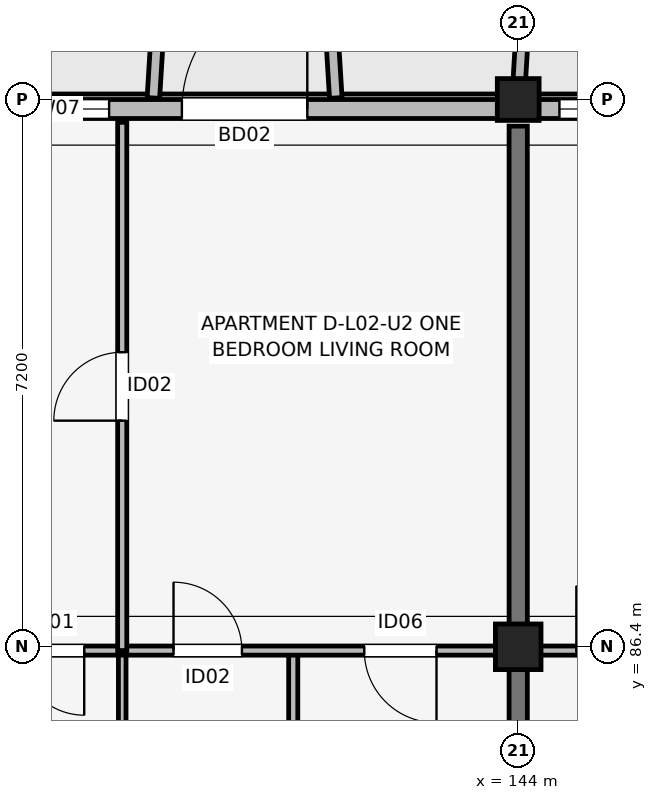
"""IFC4 building model, lengths in metres.
Left out: names, types, materials, properties, quantities, classifications, styles, units other than length and angle.
Written with IfcOpenShell. Run it as: python <this file> out.ifc"""

import sys

from ifc_helpers import new_model, si_unit, direction, frame, frame_2d, origin, origin_2d, place, context, subcontext, project, spatial, rectangle, extrude, element, fill, save


model = new_model("IFC4")
c1 = context("Model", 3, precision=1e-05, world=origin(), true_north=direction((0.0, 1.0)))
c2 = subcontext(c1, "Body", "Model", "MODEL_VIEW")
j1 = project(units=[si_unit("LENGTHUNIT", "METRE"), si_unit("PLANEANGLEUNIT", "RADIAN")], contexts=[c1])
p1 = place(None, origin())
s1 = spatial("IfcSite", under=j1, at=p1, CompositionType="ELEMENT")
p2 = place(p1, origin())
s2 = spatial("IfcBuilding", under=s1, at=p2, CompositionType="ELEMENT")
p3 = place(p2, frame((0.0, 0.0, 8.7)))
s3 = spatial("IfcBuildingStorey", under=s2, at=p3, CompositionType="ELEMENT", Elevation=8.7)
p4 = place(p3, frame((144.0, 86.4, 0.0), z_axis=(0.0, 0.0, 1.0), x_axis=(1.0, 0.0, 0.0)))
e1 = element("IfcColumn", 1, at=p4, inside=s3, PredefinedType="COLUMN", context=c2, shape_type="SweptSolid", body=[
    extrude(rectangle(XDim=0.6, YDim=0.6, at=origin_2d()), origin(), (0.0, 0.0, 1.0), 3.15),
])
p5 = place(p3, frame((144.0, 93.6, 0.0), z_axis=(0.0, 0.0, 1.0), x_axis=(1.0, 0.0, 0.0)))
e2 = element("IfcColumn", 2, at=p5, inside=s3, PredefinedType="COLUMN", context=c2, shape_type="SweptSolid", body=[
    extrude(rectangle(XDim=0.55, YDim=0.55, at=origin_2d()), origin(), (0.0, 0.0, 1.0), 3.15),
])
p6 = place(p3, frame((144.0, 83.85, 0.0), z_axis=(0.0, 0.0, 1.0), x_axis=(0.0, 1.0, 0.0)))
e3 = element("IfcWall", 3, at=p6, inside=s3, PredefinedType="SHEAR", context=c2, shape_type="SweptSolid", body=[
    extrude(rectangle(XDim=9.4, YDim=0.24, at=frame_2d((4.7, 0.0))), origin(), (0.0, 0.0, 1.0), 3.15),
])
p7 = place(p3, frame((162.8, 93.475, 0.0), z_axis=(0.0, 0.0, 1.0), x_axis=(-1.0, 0.0, 0.0)))
e4 = element("IfcWall", 4, at=p7, inside=s3, PredefinedType="SOLIDWALL", context=c2, shape_type="SweptSolid", body=[
    extrude(rectangle(XDim=30.4, YDim=0.25, at=frame_2d((15.2, 0.0))), origin(), (0.0, 0.0, 1.0), 2.43),
])
p8 = place(p7, frame((23.225, 0.0, 0.0), z_axis=(0.0, 0.0, 1.0), x_axis=(-1.0, 0.0, 0.0)))
e5 = element("IfcOpeningElement", 5, at=p8, cuts=e4, PredefinedType="OPENING", context=c2, shape_type="SweptSolid", body=[
    extrude(rectangle(XDim=1.65, YDim=2.15, at=frame_2d((0.825, 1.075))), frame((0.0, 0.135, 0.0), z_axis=(0.0, -1.0, 0.0), x_axis=(1.0, 0.0, 0.0)), (0.0, 0.0, 1.0), 0.27),
])
p9 = place(p7, frame((8.75, 0.0, 0.0), z_axis=(0.0, 0.0, 1.0), x_axis=(-1.0, 0.0, 0.0)))
e6 = element("IfcOpeningElement", 6, at=p9, cuts=e4, PredefinedType="OPENING", context=c2, shape_type="SweptSolid", body=[
    extrude(rectangle(XDim=1.5, YDim=2.15, at=frame_2d((0.75, 1.075))), frame((0.0, 0.135, 0.0), z_axis=(0.0, -1.0, 0.0), x_axis=(1.0, 0.0, 0.0)), (0.0, 0.0, 1.0), 0.27),
])
p10 = place(p7, frame((26.438, 0.0, 0.75)))
e7 = element("IfcOpeningElement", 7, at=p10, cuts=e4, PredefinedType="OPENING", context=c2, shape_type="SweptSolid", body=[
    extrude(rectangle(XDim=1.22, YDim=1.5, at=frame_2d((0.61, 0.75))), frame((0.0, 0.135, 0.0), z_axis=(0.0, -1.0, 0.0), x_axis=(1.0, 0.0, 0.0)), (0.0, 0.0, 1.0), 0.27),
])
p11 = place(p7, frame((24.183, 0.0, 0.75)))
e8 = element("IfcOpeningElement", 8, at=p11, cuts=e4, PredefinedType="OPENING", context=c2, shape_type="SweptSolid", body=[
    extrude(rectangle(XDim=1.34, YDim=1.55, at=frame_2d((0.67, 0.775))), frame((0.0, 0.135, 0.0), z_axis=(0.0, -1.0, 0.0), x_axis=(1.0, 0.0, 0.0)), (0.0, 0.0, 1.0), 0.27),
])
p12 = place(p7, frame((16.798, 0.0, 0.75)))
e9 = element("IfcOpeningElement", 9, at=p12, cuts=e4, PredefinedType="OPENING", context=c2, shape_type="SweptSolid", body=[
    extrude(rectangle(XDim=1.46, YDim=1.55, at=frame_2d((0.73, 0.775))), frame((0.0, 0.135, 0.0), z_axis=(0.0, -1.0, 0.0), x_axis=(1.0, 0.0, 0.0)), (0.0, 0.0, 1.0), 0.27),
])
p13 = place(p7, frame((14.34, 0.0, 0.7)))
e10 = element("IfcOpeningElement", 10, at=p13, cuts=e4, PredefinedType="OPENING", context=c2, shape_type="SweptSolid", body=[
    extrude(rectangle(XDim=1.72, YDim=1.6, at=frame_2d((0.86, 0.8))), frame((0.0, 0.135, 0.0), z_axis=(0.0, -1.0, 0.0), x_axis=(1.0, 0.0, 0.0)), (0.0, 0.0, 1.0), 0.27),
])
p14 = place(p7, frame((9.968, 0.0, 0.75)))
e11 = element("IfcOpeningElement", 11, at=p14, cuts=e4, PredefinedType="OPENING", context=c2, shape_type="SweptSolid", body=[
    extrude(rectangle(XDim=0.72, YDim=1.35, at=frame_2d((0.36, 0.675))), frame((0.0, 0.135, 0.0), z_axis=(0.0, -1.0, 0.0), x_axis=(1.0, 0.0, 0.0)), (0.0, 0.0, 1.0), 0.27),
])
p15 = place(p7, frame((2.183, 0.0, 0.7)))
e12 = element("IfcOpeningElement", 12, at=p15, cuts=e4, PredefinedType="OPENING", context=c2, shape_type="SweptSolid", body=[
    extrude(rectangle(XDim=1.72, YDim=1.6, at=frame_2d((0.86, 0.8))), frame((0.0, 0.135, 0.0), z_axis=(0.0, -1.0, 0.0), x_axis=(1.0, 0.0, 0.0)), (0.0, 0.0, 1.0), 0.27),
])
for number, where, z_axis, x_axis in (
    (13, (139.2, 93.62, 0.0), (0.0, 0.0, 1.0), (0.061, 0.998, 0.0)),
    (14, (141.6, 93.62, 0.0), (0.0, 0.0, 1.0), (-0.061, 0.998, 0.0)),
):
    element("IfcWall", number, at=place(p3, frame(where, z_axis=z_axis, x_axis=x_axis)), inside=s3, PredefinedType="ELEMENTEDWALL", context=c2, shape_type="SweptSolid", body=[
        extrude(rectangle(XDim=1.964, YDim=0.165, at=frame_2d((0.982, 0.0))), origin(), (0.0, 0.0, 1.0), 2.53),
    ])
p16 = place(p3, frame((144.0, 93.62, 0.0), z_axis=(0.0, 0.0, 1.0), x_axis=(0.061170732449, 0.998127317276, 0.0)))
e15 = element("IfcWall", 15, at=p16, inside=s3, PredefinedType="ELEMENTEDWALL", context=c2, shape_type="SweptSolid", body=[
    extrude(rectangle(XDim=1.964, YDim=0.165, at=frame_2d((0.982, 0.0))), origin(), (0.0, 0.0, 1.0), 2.95),
])
p17 = place(p3, frame((138.79, 83.7, 0.0), z_axis=(0.0, 0.0, 1.0), x_axis=(0.0, 1.0, 0.0)))
e16 = element("IfcWall", 16, at=p17, inside=s3, PredefinedType="PARTITIONING", context=c2, shape_type="SweptSolid", body=[
    extrude(rectangle(XDim=2.65, YDim=0.1, at=frame_2d((1.325, 0.0))), origin(), (0.0, 0.0, 1.0), 2.375),
])
p18 = place(p3, frame((141.04, 83.7, 0.0), z_axis=(0.0, 0.0, 1.0), x_axis=(0.0, 1.0, 0.0)))
e17 = element("IfcWall", 17, at=p18, inside=s3, PredefinedType="PARTITIONING", context=c2, shape_type="SweptSolid", body=[
    extrude(rectangle(XDim=2.65, YDim=0.12, at=frame_2d((1.325, 0.0))), origin(), (0.0, 0.0, 1.0), 2.375),
])
p19 = place(p3, frame((136.94, 86.35, 0.0), z_axis=(0.0, 0.0, 1.0), x_axis=(1.0, 0.0, 0.0)))
e18 = element("IfcWall", 18, at=p19, inside=s3, PredefinedType="PARTITIONING", context=c2, shape_type="SweptSolid", body=[
    extrude(rectangle(XDim=6.92, YDim=0.12, at=frame_2d((3.46, 0.0))), origin(), (0.0, 0.0, 1.0), 2.375),
])
p20 = place(p19, frame((1.35, 0.0, 0.0), z_axis=(0.0, 0.0, 1.0), x_axis=(-1.0, 0.0, 0.0)))
e19 = element("IfcOpeningElement", 19, at=p20, cuts=e18, PredefinedType="OPENING", context=c2, shape_type="SweptSolid", body=[
    extrude(rectangle(XDim=0.85, YDim=2.08, at=frame_2d((0.425, 1.04))), frame((0.0, 0.07, 0.0), z_axis=(0.0, -1.0, 0.0), x_axis=(1.0, 0.0, 0.0)), (0.0, 0.0, 1.0), 0.14),
])
p21 = place(p19, frame((2.525, 0.0, 0.0)))
e20 = element("IfcOpeningElement", 20, at=p21, cuts=e18, PredefinedType="OPENING", context=c2, shape_type="SweptSolid", body=[
    extrude(rectangle(XDim=0.9, YDim=2.08, at=frame_2d((0.45, 1.04))), frame((0.0, 0.07, 0.0), z_axis=(0.0, -1.0, 0.0), x_axis=(1.0, 0.0, 0.0)), (0.0, 0.0, 1.0), 0.14),
])
p22 = place(p19, frame((5.985, 0.0, 0.0), z_axis=(0.0, 0.0, 1.0), x_axis=(-1.0, 0.0, 0.0)))
e21 = element("IfcOpeningElement", 21, at=p22, cuts=e18, PredefinedType="OPENING", context=c2, shape_type="SweptSolid", body=[
    extrude(rectangle(XDim=0.95, YDim=2.08, at=frame_2d((0.475, 1.04))), frame((0.0, 0.07, 0.0), z_axis=(0.0, -1.0, 0.0), x_axis=(1.0, 0.0, 0.0)), (0.0, 0.0, 1.0), 0.14),
])
p23 = place(p3, frame((138.79, 86.35, 0.0), z_axis=(0.0, 0.0, 1.0), x_axis=(0.0, 1.0, 0.0)))
e22 = element("IfcWall", 22, at=p23, inside=s3, PredefinedType="PARTITIONING", context=c2, shape_type="SweptSolid", body=[
    extrude(rectangle(XDim=6.95, YDim=0.12, at=frame_2d((3.475, 0.0))), origin(), (0.0, 0.0, 1.0), 2.375),
])
p24 = place(p23, frame((3.025, 0.0, 0.0)))
e23 = element("IfcOpeningElement", 23, at=p24, cuts=e22, PredefinedType="OPENING", context=c2, shape_type="SweptSolid", body=[
    extrude(rectangle(XDim=0.9, YDim=2.08, at=frame_2d((0.45, 1.04))), frame((0.0, 0.07, 0.0), z_axis=(0.0, -1.0, 0.0), x_axis=(1.0, 0.0, 0.0)), (0.0, 0.0, 1.0), 0.14),
])
p25 = place(p3, frame((144.14, 86.35, 0.0), z_axis=(0.0, 0.0, 1.0), x_axis=(1.0, 0.0, 0.0)))
e24 = element("IfcWall", 24, at=p25, inside=s3, PredefinedType="PARTITIONING", context=c2, shape_type="SweptSolid", body=[
    extrude(rectangle(XDim=6.92, YDim=0.12, at=frame_2d((3.46, 0.0))), origin(), (0.0, 0.0, 1.0), 2.375),
])
p26 = place(p25, frame((0.625, 0.0, 0.0)))
e25 = element("IfcOpeningElement", 25, at=p26, cuts=e24, PredefinedType="OPENING", context=c2, shape_type="SweptSolid", body=[
    extrude(rectangle(XDim=0.85, YDim=2.08, at=frame_2d((0.425, 1.04))), frame((0.0, 0.07, 0.0), z_axis=(0.0, -1.0, 0.0), x_axis=(1.0, 0.0, 0.0)), (0.0, 0.0, 1.0), 0.14),
])
p27 = place(p25, frame((3.525, 0.0, 0.0), z_axis=(0.0, 0.0, 1.0), x_axis=(-1.0, 0.0, 0.0)))
e26 = element("IfcOpeningElement", 26, at=p27, cuts=e24, PredefinedType="OPENING", context=c2, shape_type="SweptSolid", body=[
    extrude(rectangle(XDim=0.9, YDim=2.08, at=frame_2d((0.45, 1.04))), frame((0.0, 0.07, 0.0), z_axis=(0.0, -1.0, 0.0), x_axis=(1.0, 0.0, 0.0)), (0.0, 0.0, 1.0), 0.14),
])
p28 = place(p25, frame((5.01, 0.0, 0.0)))
e27 = element("IfcOpeningElement", 27, at=p28, cuts=e24, PredefinedType="OPENING", context=c2, shape_type="SweptSolid", body=[
    extrude(rectangle(XDim=0.95, YDim=2.08, at=frame_2d((0.475, 1.04))), frame((0.0, 0.07, 0.0), z_axis=(0.0, -1.0, 0.0), x_axis=(1.0, 0.0, 0.0)), (0.0, 0.0, 1.0), 0.14),
])
p29 = place(p8, origin())
e28 = element("IfcDoor", 28, at=p29, inside=s3, OperationType="SINGLE_SWING_LEFT", PredefinedType="DOOR", context=c2, shape_type="SweptSolid", body=[
    extrude(rectangle(XDim=1.65, YDim=2.15, at=frame_2d((0.825, 1.075))), frame((0.0, 0.025, 0.0), z_axis=(0.0, -1.0, 0.0), x_axis=(1.0, 0.0, 0.0)), (0.0, 0.0, 1.0), 0.05),
])
fill(e5, e28)
p30 = place(p11, origin())
e29 = element("IfcWindow", 29, at=p30, inside=s3, PartitioningType="SINGLE_PANEL", PredefinedType="WINDOW", context=c2, shape_type="SweptSolid", body=[
    extrude(rectangle(XDim=1.34, YDim=1.55, at=frame_2d((0.67, 0.775))), frame((0.0, 0.03, 0.0), z_axis=(0.0, -1.0, 0.0), x_axis=(1.0, 0.0, 0.0)), (0.0, 0.0, 1.0), 0.06),
])
fill(e8, e29)
p31 = place(p12, origin())
e30 = element("IfcWindow", 30, at=p31, inside=s3, PartitioningType="SINGLE_PANEL", PredefinedType="WINDOW", context=c2, shape_type="SweptSolid", body=[
    extrude(rectangle(XDim=1.46, YDim=1.55, at=frame_2d((0.73, 0.775))), frame((0.0, 0.03, 0.0), z_axis=(0.0, -1.0, 0.0), x_axis=(1.0, 0.0, 0.0)), (0.0, 0.0, 1.0), 0.06),
])
fill(e9, e30)
p32 = place(p20, origin())
e31 = element("IfcDoor", 31, at=p32, inside=s3, OperationType="SINGLE_SWING_RIGHT", PredefinedType="DOOR", context=c2, shape_type="SweptSolid", body=[
    extrude(rectangle(XDim=0.85, YDim=2.08, at=frame_2d((0.425, 1.04))), frame((0.0, 0.025, 0.0), z_axis=(0.0, -1.0, 0.0), x_axis=(1.0, 0.0, 0.0)), (0.0, 0.0, 1.0), 0.05),
])
fill(e19, e31)
p33 = place(p21, origin())
e32 = element("IfcDoor", 32, at=p33, inside=s3, OperationType="SINGLE_SWING_LEFT", PredefinedType="DOOR", context=c2, shape_type="SweptSolid", body=[
    extrude(rectangle(XDim=0.9, YDim=2.08, at=frame_2d((0.45, 1.04))), frame((0.0, 0.025, 0.0), z_axis=(0.0, -1.0, 0.0), x_axis=(1.0, 0.0, 0.0)), (0.0, 0.0, 1.0), 0.05),
])
fill(e20, e32)
p34 = place(p22, origin())
e33 = element("IfcDoor", 33, at=p34, inside=s3, OperationType="SINGLE_SWING_RIGHT", PredefinedType="DOOR", context=c2, shape_type="SweptSolid", body=[
    extrude(rectangle(XDim=0.95, YDim=2.08, at=frame_2d((0.475, 1.04))), frame((0.0, 0.025, 0.0), z_axis=(0.0, -1.0, 0.0), x_axis=(1.0, 0.0, 0.0)), (0.0, 0.0, 1.0), 0.05),
])
fill(e21, e33)
p35 = place(p24, origin())
e34 = element("IfcDoor", 34, at=p35, inside=s3, OperationType="SINGLE_SWING_LEFT", PredefinedType="DOOR", context=c2, shape_type="SweptSolid", body=[
    extrude(rectangle(XDim=0.9, YDim=2.08, at=frame_2d((0.45, 1.04))), frame((0.0, 0.025, 0.0), z_axis=(0.0, -1.0, 0.0), x_axis=(1.0, 0.0, 0.0)), (0.0, 0.0, 1.0), 0.05),
])
fill(e23, e34)
p36 = place(p26, origin())
e35 = element("IfcDoor", 35, at=p36, inside=s3, OperationType="SINGLE_SWING_LEFT", PredefinedType="DOOR", context=c2, shape_type="SweptSolid", body=[
    extrude(rectangle(XDim=0.85, YDim=2.08, at=frame_2d((0.425, 1.04))), frame((0.0, 0.025, 0.0), z_axis=(0.0, -1.0, 0.0), x_axis=(1.0, 0.0, 0.0)), (0.0, 0.0, 1.0), 0.05),
])
fill(e25, e35)
save(model, sys.argv[1])
